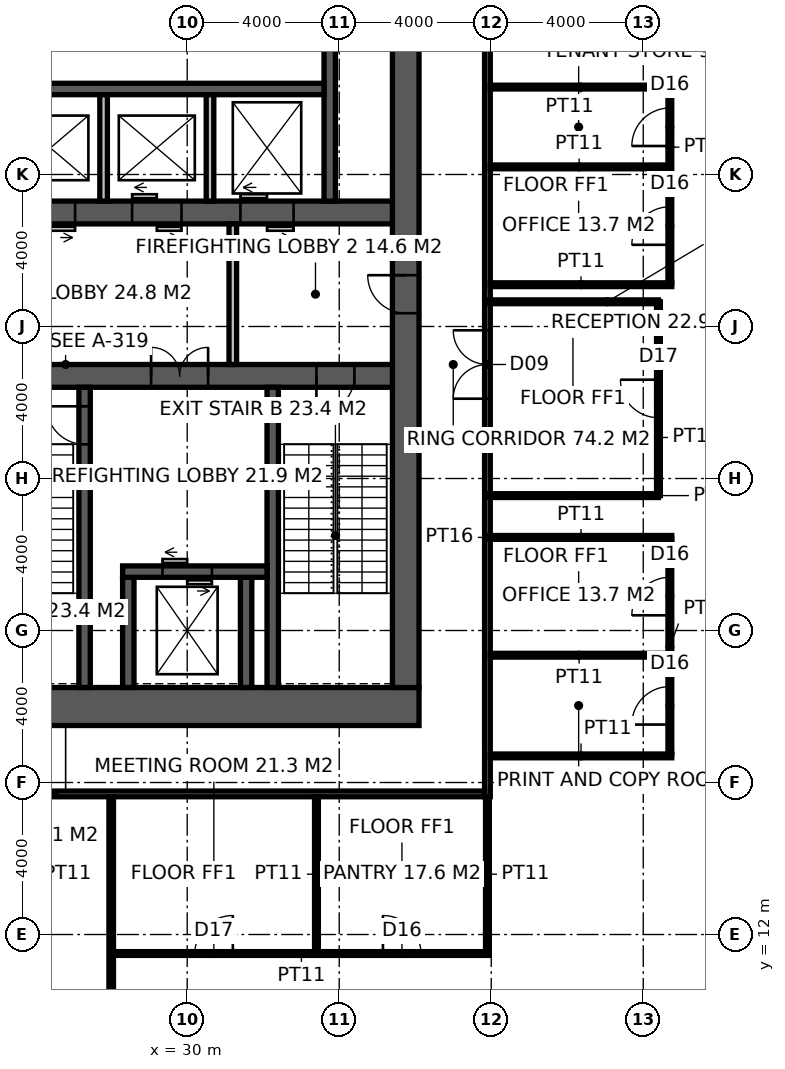
"""IFC4 building model, lengths in metres.
Left out: names, types, materials, properties, quantities, classifications, styles, units other than length and angle.
Written with IfcOpenShell. Run it as: python <this file> out.ifc"""

import sys

from ifc_helpers import new_model, si_unit, direction, frame, frame_2d, origin, place, context, subcontext, project, spatial, rectangle, extrude, element, fill, save


model = new_model("IFC4")
c1 = context("Model", 3, precision=1e-05, world=origin(), true_north=direction((0.0, 1.0)))
c2 = subcontext(c1, "Body", "Model", "MODEL_VIEW")
j1 = project(units=[si_unit("LENGTHUNIT", "METRE"), si_unit("PLANEANGLEUNIT", "RADIAN")], contexts=[c1])
p1 = place(None, origin())
s1 = spatial("IfcSite", under=j1, at=p1, CompositionType="ELEMENT")
p2 = place(p1, origin())
s2 = spatial("IfcBuilding", under=s1, at=p2, CompositionType="ELEMENT")
p3 = place(p2, frame((0.0, 0.0, 76.4)))
s3 = spatial("IfcBuildingStorey", under=s2, at=p3, CompositionType="ELEMENT", Elevation=76.4)
p4 = place(p3, frame((18.5, 18.0, -0.15), z_axis=(0.0, 0.0, 1.0), x_axis=(1.0, 0.0, 0.0)))
e1 = element("IfcWall", 1, at=p4, inside=s3, PredefinedType="SHEAR", context=c2, shape_type="SweptSolid", body=[
    extrude(rectangle(XDim=17.6, YDim=1.0, at=frame_2d((8.8, 0.0))), origin(), (0.0, 0.0, 1.0), 5.0),
])
p5 = place(p4, frame((3.45, 0.0, 0.15)))
e2 = element("IfcOpeningElement", 2, at=p5, cuts=e1, PredefinedType="OPENING", context=c2, shape_type="SweptSolid", body=[
    extrude(rectangle(XDim=1.5, YDim=2.4, at=frame_2d((0.75, 1.2))), frame((0.0, 0.51, 0.0), z_axis=(0.0, -1.0, 0.0), x_axis=(1.0, 0.0, 0.0)), (0.0, 0.0, 1.0), 1.02),
])
p6 = place(p3, frame((35.75, 18.5, -0.15), z_axis=(0.0, 0.0, 1.0), x_axis=(0.0, 1.0, 0.0)))
e3 = element("IfcWall", 3, at=p6, inside=s3, PredefinedType="SHEAR", context=c2, shape_type="SweptSolid", body=[
    extrude(rectangle(XDim=17.0, YDim=0.7, at=frame_2d((8.5, 0.0))), origin(), (0.0, 0.0, 1.0), 5.0),
])
p7 = place(p6, frame((9.85, 0.0, 0.15)))
e4 = element("IfcOpeningElement", 4, at=p7, cuts=e3, PredefinedType="OPENING", context=c2, shape_type="SweptSolid", body=[
    extrude(rectangle(XDim=1.0, YDim=2.2, at=frame_2d((0.5, 1.1))), frame((0.0, 0.36, 0.0), z_axis=(0.0, -1.0, 0.0), x_axis=(1.0, 0.0, 0.0)), (0.0, 0.0, 1.0), 0.72),
])
p8 = place(p3, frame((24.15, 26.7, -0.15), z_axis=(0.0, 0.0, 1.0), x_axis=(1.0, 0.0, 0.0)))
e5 = element("IfcWall", 5, at=p8, inside=s3, PredefinedType="SHEAR", context=c2, shape_type="SweptSolid", body=[
    extrude(rectangle(XDim=11.25, YDim=0.6, at=frame_2d((5.625, 0.0))), origin(), (0.0, 0.0, 1.0), 5.0),
])
p9 = place(p8, frame((9.25, 0.0, 0.15)))
e6 = element("IfcOpeningElement", 6, at=p9, cuts=e5, PredefinedType="OPENING", context=c2, shape_type="SweptSolid", body=[
    extrude(rectangle(XDim=1.0, YDim=2.2, at=frame_2d((0.5, 1.1))), frame((0.0, 0.31, 0.0), z_axis=(0.0, -1.0, 0.0), x_axis=(1.0, 0.0, 0.0)), (0.0, 0.0, 1.0), 0.62),
])
p10 = place(p8, frame((4.9, 0.0, 0.15)))
e7 = element("IfcOpeningElement", 7, at=p10, cuts=e5, PredefinedType="OPENING", context=c2, shape_type="SweptSolid", body=[
    extrude(rectangle(XDim=1.5, YDim=2.4, at=frame_2d((0.75, 1.2))), frame((0.0, 0.31, 0.0), z_axis=(0.0, -1.0, 0.0), x_axis=(1.0, 0.0, 0.0)), (0.0, 0.0, 1.0), 0.62),
])
p11 = place(p3, frame((27.3, 18.5, -0.15), z_axis=(0.0, 0.0, 1.0), x_axis=(0.0, 1.0, 0.0)))
e8 = element("IfcWall", 8, at=p11, inside=s3, PredefinedType="SHEAR", context=c2, shape_type="SweptSolid", body=[
    extrude(rectangle(XDim=7.9, YDim=0.3, at=frame_2d((3.95, 0.0))), origin(), (0.0, 0.0, 1.0), 5.0),
])
p12 = place(p11, frame((6.4, 0.0, 0.15)))
e9 = element("IfcOpeningElement", 9, at=p12, cuts=e8, PredefinedType="OPENING", context=c2, shape_type="SweptSolid", body=[
    extrude(rectangle(XDim=1.0, YDim=2.2, at=frame_2d((0.5, 1.1))), frame((0.0, 0.16, 0.0), z_axis=(0.0, -1.0, 0.0), x_axis=(1.0, 0.0, 0.0)), (0.0, 0.0, 1.0), 0.32),
])
p13 = place(p3, frame((32.25, 18.5, -0.15), z_axis=(0.0, 0.0, 1.0), x_axis=(0.0, 1.0, 0.0)))
e10 = element("IfcWall", 10, at=p13, inside=s3, PredefinedType="SHEAR", context=c2, shape_type="SweptSolid", body=[
    extrude(rectangle(XDim=7.9, YDim=0.3, at=frame_2d((3.95, 0.0))), origin(), (0.0, 0.0, 1.0), 5.0),
])
for number, where, z_axis, x_axis in (
    (11, (28.45, 18.5, -0.15), (0.0, 0.0, 1.0), (0.0, 1.0, 0.0)),
    (12, (31.55, 18.5, -0.15), (0.0, 0.0, 1.0), (0.0, 1.0, 0.0)),
):
    element("IfcWall", number, at=place(p3, frame(where, z_axis=z_axis, x_axis=x_axis)), inside=s3, PredefinedType="SHEAR", context=c2, shape_type="SweptSolid", body=[
        extrude(rectangle(XDim=2.9, YDim=0.3, at=frame_2d((1.45, 0.0))), origin(), (0.0, 0.0, 1.0), 5.0),
    ])
p14 = place(p3, frame((28.3, 21.55, -0.15), z_axis=(0.0, 0.0, 1.0), x_axis=(1.0, 0.0, 0.0)))
e13 = element("IfcWall", 13, at=p14, inside=s3, PredefinedType="SHEAR", context=c2, shape_type="SweptSolid", body=[
    extrude(rectangle(XDim=3.8, YDim=0.3, at=frame_2d((1.9, 0.0))), origin(), (0.0, 0.0, 1.0), 5.0),
])
p15 = place(p14, frame((1.05, 0.0, 0.15)))
e14 = element("IfcOpeningElement", 14, at=p15, cuts=e13, PredefinedType="OPENING", context=c2, shape_type="SweptSolid", body=[
    extrude(rectangle(XDim=1.3, YDim=2.4, at=frame_2d((0.65, 1.2))), frame((0.0, 0.16, 0.0), z_axis=(0.0, -1.0, 0.0), x_axis=(1.0, 0.0, 0.0)), (0.0, 0.0, 1.0), 0.32),
])
p16 = place(p3, frame((24.15, 31.0, -0.15), z_axis=(0.0, 0.0, 1.0), x_axis=(1.0, 0.0, 0.0)))
e15 = element("IfcWall", 15, at=p16, inside=s3, PredefinedType="SHEAR", context=c2, shape_type="SweptSolid", body=[
    extrude(rectangle(XDim=11.25, YDim=0.6, at=frame_2d((5.625, 0.0))), origin(), (0.0, 0.0, 1.0), 5.0),
])
p17 = place(p16, frame((1.6, 0.0, 0.15)))
e16 = element("IfcOpeningElement", 16, at=p17, cuts=e15, PredefinedType="OPENING", context=c2, shape_type="SweptSolid", body=[
    extrude(rectangle(XDim=1.3, YDim=2.4, at=frame_2d((0.65, 1.2))), frame((0.0, 0.31, 0.0), z_axis=(0.0, -1.0, 0.0), x_axis=(1.0, 0.0, 0.0)), (0.0, 0.0, 1.0), 0.62),
])
p18 = place(p16, frame((4.4, 0.0, 0.15)))
e17 = element("IfcOpeningElement", 17, at=p18, cuts=e15, PredefinedType="OPENING", context=c2, shape_type="SweptSolid", body=[
    extrude(rectangle(XDim=1.3, YDim=2.4, at=frame_2d((0.65, 1.2))), frame((0.0, 0.31, 0.0), z_axis=(0.0, -1.0, 0.0), x_axis=(1.0, 0.0, 0.0)), (0.0, 0.0, 1.0), 0.62),
])
p19 = place(p16, frame((7.25, 0.0, 0.15)))
e18 = element("IfcOpeningElement", 18, at=p19, cuts=e15, PredefinedType="OPENING", context=c2, shape_type="SweptSolid", body=[
    extrude(rectangle(XDim=1.4, YDim=2.4, at=frame_2d((0.7, 1.2))), frame((0.0, 0.31, 0.0), z_axis=(0.0, -1.0, 0.0), x_axis=(1.0, 0.0, 0.0)), (0.0, 0.0, 1.0), 0.62),
])
p20 = place(p3, frame((33.75, 31.3, -0.15), z_axis=(0.0, 0.0, 1.0), x_axis=(0.0, 1.0, 0.0)))
e19 = element("IfcWall", 19, at=p20, inside=s3, PredefinedType="SHEAR", context=c2, shape_type="SweptSolid", body=[
    extrude(rectangle(XDim=4.2, YDim=0.3, at=frame_2d((2.1, 0.0))), origin(), (0.0, 0.0, 1.0), 5.0),
])
p21 = place(p3, frame((25.0, 34.25, -0.15), z_axis=(0.0, 0.0, 1.0), x_axis=(1.0, 0.0, 0.0)))
e20 = element("IfcWall", 20, at=p21, inside=s3, PredefinedType="SHEAR", context=c2, shape_type="SweptSolid", body=[
    extrude(rectangle(XDim=8.6, YDim=0.3, at=frame_2d((4.3, 0.0))), origin(), (0.0, 0.0, 1.0), 5.0),
])
for number, where, z_axis, x_axis in (
    (21, (27.8, 31.3, -0.15), (0.0, 0.0, 1.0), (0.0, 1.0, 0.0)),
    (22, (30.6, 31.3, -0.15), (0.0, 0.0, 1.0), (0.0, 1.0, 0.0)),
):
    element("IfcWall", number, at=place(p3, frame(where, z_axis=z_axis, x_axis=x_axis)), inside=s3, PredefinedType="SOLIDWALL", context=c2, shape_type="SweptSolid", body=[
        extrude(rectangle(XDim=2.8, YDim=0.2, at=frame_2d((1.4, 0.0))), origin(), (0.0, 0.0, 1.0), 5.0),
    ])
p22 = place(p3, frame((31.2, 27.0, 0.0), z_axis=(0.0, 0.0, 1.0), x_axis=(0.0, 1.0, 0.0)))
e23 = element("IfcWall", 23, at=p22, inside=s3, PredefinedType="SOLIDWALL", context=c2, shape_type="SweptSolid", body=[
    extrude(rectangle(XDim=3.7, YDim=0.2, at=frame_2d((1.85, 0.0))), origin(), (0.0, 0.0, 1.0), 4.85),
])
p23 = place(p3, frame((37.9, 15.625, 0.0), z_axis=(0.0, 0.0, 1.0), x_axis=(0.0, 1.0, 0.0)))
e24 = element("IfcWall", 24, at=p23, inside=s3, PredefinedType="PARTITIONING", context=c2, shape_type="SweptSolid", body=[
    extrude(rectangle(XDim=22.75, YDim=0.15, at=frame_2d((11.375, 0.0))), origin(), (0.0, 0.0, 1.0), 3.95),
])
p24 = place(p23, frame((10.475, 0.0, 0.0)))
e25 = element("IfcOpeningElement", 25, at=p24, cuts=e24, PredefinedType="OPENING", context=c2, shape_type="SweptSolid", body=[
    extrude(rectangle(XDim=1.8, YDim=2.4, at=frame_2d((0.9, 1.2))), frame((0.0, 0.085, 0.0), z_axis=(0.0, -1.0, 0.0), x_axis=(1.0, 0.0, 0.0)), (0.0, 0.0, 1.0), 0.17),
])
p25 = place(p3, frame((15.175, 15.7, 0.0), z_axis=(0.0, 0.0, 1.0), x_axis=(1.0, 0.0, 0.0)))
e26 = element("IfcWall", 26, at=p25, inside=s3, PredefinedType="PARTITIONING", context=c2, shape_type="SweptSolid", body=[
    extrude(rectangle(XDim=22.65, YDim=0.15, at=frame_2d((11.325, 0.0))), origin(), (0.0, 0.0, 1.0), 4.85),
])
p26 = place(p3, frame((28.0, 0.3, 0.0), z_axis=(0.0, 0.0, 1.0), x_axis=(0.0, 1.0, 0.0)))
e27 = element("IfcWall", 27, at=p26, inside=s3, PredefinedType="PARTITIONING", context=c2, shape_type="SweptSolid", body=[
    extrude(rectangle(XDim=15.325, YDim=0.12, at=frame_2d((7.663, 0.0))), origin(), (0.0, 0.0, 1.0), 4.85),
])
p27 = place(p3, frame((28.061, 11.5, 0.0), z_axis=(0.0, 0.0, 1.0), x_axis=(1.0, 0.0, 0.0)))
e28 = element("IfcWall", 28, at=p27, inside=s3, PredefinedType="PARTITIONING", context=c2, shape_type="SweptSolid", body=[
    extrude(rectangle(XDim=9.889, YDim=0.1, at=frame_2d((4.944, 0.0))), origin(), (0.0, 0.0, 1.0), 4.85),
])
p28 = place(p27, frame((2.14, 0.0, 0.0)))
e29 = element("IfcOpeningElement", 29, at=p28, cuts=e28, PredefinedType="OPENING", context=c2, shape_type="SweptSolid", body=[
    extrude(rectangle(XDim=1.0, YDim=2.2, at=frame_2d((0.5, 1.1))), frame((0.0, 0.06, 0.0), z_axis=(0.0, -1.0, 0.0), x_axis=(1.0, 0.0, 0.0)), (0.0, 0.0, 1.0), 0.12),
])
p29 = place(p27, frame((7.09, 0.0, 0.0)))
e30 = element("IfcOpeningElement", 30, at=p29, cuts=e28, PredefinedType="OPENING", context=c2, shape_type="SweptSolid", body=[
    extrude(rectangle(XDim=1.0, YDim=2.2, at=frame_2d((0.5, 1.1))), frame((0.0, 0.06, 0.0), z_axis=(0.0, -1.0, 0.0), x_axis=(1.0, 0.0, 0.0)), (0.0, 0.0, 1.0), 0.12),
])
p30 = place(p3, frame((37.975, 16.7, 0.0), z_axis=(0.0, 0.0, 1.0), x_axis=(1.0, 0.0, 0.0)))
e31 = element("IfcWall", 31, at=p30, inside=s3, PredefinedType="PARTITIONING", context=c2, shape_type="SweptSolid", body=[
    extrude(rectangle(XDim=4.775, YDim=0.1, at=frame_2d((2.387, 0.0))), origin(), (0.0, 0.0, 1.0), 4.85),
])
p31 = place(p3, frame((37.975, 19.35, 0.0), z_axis=(0.0, 0.0, 1.0), x_axis=(1.0, 0.0, 0.0)))
e32 = element("IfcWall", 32, at=p31, inside=s3, PredefinedType="PARTITIONING", context=c2, shape_type="SweptSolid", body=[
    extrude(rectangle(XDim=4.675, YDim=0.1, at=frame_2d((2.337, 0.0))), origin(), (0.0, 0.0, 1.0), 4.85),
])
for number, where, z_axis, x_axis in (
    (33, (37.975, 22.45, 0.0), (0.0, 0.0, 1.0), (1.0, 0.0, 0.0)),
    (34, (37.975, 29.1, 0.0), (0.0, 0.0, 1.0), (1.0, 0.0, 0.0)),
):
    element("IfcWall", number, at=place(p3, frame(where, z_axis=z_axis, x_axis=x_axis)), inside=s3, PredefinedType="PARTITIONING", context=c2, shape_type="SweptSolid", body=[
        extrude(rectangle(XDim=4.775, YDim=0.1, at=frame_2d((2.387, 0.0))), origin(), (0.0, 0.0, 1.0), 4.85),
    ])
p32 = place(p3, frame((37.975, 32.2, 0.0), z_axis=(0.0, 0.0, 1.0), x_axis=(1.0, 0.0, 0.0)))
e35 = element("IfcWall", 35, at=p32, inside=s3, PredefinedType="PARTITIONING", context=c2, shape_type="SweptSolid", body=[
    extrude(rectangle(XDim=4.675, YDim=0.1, at=frame_2d((2.337, 0.0))), origin(), (0.0, 0.0, 1.0), 3.95),
])
p33 = place(p3, frame((37.975, 34.3, 0.0), z_axis=(0.0, 0.0, 1.0), x_axis=(1.0, 0.0, 0.0)))
e36 = element("IfcWall", 36, at=p33, inside=s3, PredefinedType="PARTITIONING", context=c2, shape_type="SweptSolid", body=[
    extrude(rectangle(XDim=4.775, YDim=0.1, at=frame_2d((2.387, 0.0))), origin(), (0.0, 0.0, 1.0), 4.85),
])
p34 = place(p3, frame((33.401, 11.55, 0.0), z_axis=(0.0, 0.0, 1.0), x_axis=(0.0, 1.0, 0.0)))
e37 = element("IfcWall", 37, at=p34, inside=s3, PredefinedType="PARTITIONING", context=c2, shape_type="SweptSolid", body=[
    extrude(rectangle(XDim=4.075, YDim=0.1, at=frame_2d((2.038, 0.0))), origin(), (0.0, 0.0, 1.0), 4.85),
])
p35 = place(p3, frame((37.9, 11.55, 0.0), z_axis=(0.0, 0.0, 1.0), x_axis=(0.0, 1.0, 0.0)))
e38 = element("IfcWall", 38, at=p35, inside=s3, PredefinedType="PARTITIONING", context=c2, shape_type="SweptSolid", body=[
    extrude(rectangle(XDim=4.075, YDim=0.1, at=frame_2d((2.038, 0.0))), origin(), (0.0, 0.0, 1.0), 3.95),
])
p36 = place(p3, frame((42.7, 16.75, 0.0), z_axis=(0.0, 0.0, 1.0), x_axis=(0.0, 1.0, 0.0)))
e39 = element("IfcWall", 39, at=p36, inside=s3, PredefinedType="PARTITIONING", context=c2, shape_type="SweptSolid", body=[
    extrude(rectangle(XDim=5.65, YDim=0.1, at=frame_2d((2.825, 0.0))), origin(), (0.0, 0.0, 1.0), 4.85),
])
p37 = place(p36, frame((0.775, 0.0, 0.0)))
e40 = element("IfcOpeningElement", 40, at=p37, cuts=e39, PredefinedType="OPENING", context=c2, shape_type="SweptSolid", body=[
    extrude(rectangle(XDim=1.0, YDim=2.2, at=frame_2d((0.5, 1.1))), frame((0.0, 0.06, 0.0), z_axis=(0.0, -1.0, 0.0), x_axis=(1.0, 0.0, 0.0)), (0.0, 0.0, 1.0), 0.12),
])
p38 = place(p36, frame((3.65, 0.0, 0.0)))
e41 = element("IfcOpeningElement", 41, at=p38, cuts=e39, PredefinedType="OPENING", context=c2, shape_type="SweptSolid", body=[
    extrude(rectangle(XDim=1.0, YDim=2.2, at=frame_2d((0.5, 1.1))), frame((0.0, 0.06, 0.0), z_axis=(0.0, -1.0, 0.0), x_axis=(1.0, 0.0, 0.0)), (0.0, 0.0, 1.0), 0.12),
])
p39 = place(p3, frame((42.7, 29.15, 0.0), z_axis=(0.0, 0.0, 1.0), x_axis=(0.0, 1.0, 0.0)))
e42 = element("IfcWall", 42, at=p39, inside=s3, PredefinedType="PARTITIONING", context=c2, shape_type="SweptSolid", body=[
    extrude(rectangle(XDim=5.1, YDim=0.1, at=frame_2d((2.55, 0.0))), origin(), (0.0, 0.0, 1.0), 4.85),
])
p40 = place(p39, frame((1.0, 0.0, 0.0)))
e43 = element("IfcOpeningElement", 43, at=p40, cuts=e42, PredefinedType="OPENING", context=c2, shape_type="SweptSolid", body=[
    extrude(rectangle(XDim=1.0, YDim=2.2, at=frame_2d((0.5, 1.1))), frame((0.0, 0.06, 0.0), z_axis=(0.0, -1.0, 0.0), x_axis=(1.0, 0.0, 0.0)), (0.0, 0.0, 1.0), 0.12),
])
p41 = place(p39, frame((3.6, 0.0, 0.0)))
e44 = element("IfcOpeningElement", 44, at=p41, cuts=e42, PredefinedType="OPENING", context=c2, shape_type="SweptSolid", body=[
    extrude(rectangle(XDim=1.0, YDim=2.2, at=frame_2d((0.5, 1.1))), frame((0.0, 0.06, 0.0), z_axis=(0.0, -1.0, 0.0), x_axis=(1.0, 0.0, 0.0)), (0.0, 0.0, 1.0), 0.12),
])
p42 = place(p3, frame((37.9, 23.55, 0.0), z_axis=(0.0, 0.0, 1.0), x_axis=(1.0, 0.0, 0.0)))
e45 = element("IfcWall", 45, at=p42, inside=s3, PredefinedType="PARTITIONING", context=c2, shape_type="SweptSolid", body=[
    extrude(rectangle(XDim=4.5, YDim=0.1, at=frame_2d((2.25, 0.0))), origin(), (0.0, 0.0, 1.0), 3.95),
])
p43 = place(p3, frame((42.4, 23.55, 0.0), z_axis=(0.0, 0.0, 1.0), x_axis=(0.0, 1.0, 0.0)))
e46 = element("IfcWall", 46, at=p43, inside=s3, PredefinedType="PARTITIONING", context=c2, shape_type="SweptSolid", body=[
    extrude(rectangle(XDim=5.1, YDim=0.1, at=frame_2d((2.55, 0.0))), origin(), (0.0, 0.0, 1.0), 4.85),
])
p44 = place(p43, frame((2.05, 0.0, 0.0)))
e47 = element("IfcOpeningElement", 47, at=p44, cuts=e46, PredefinedType="OPENING", context=c2, shape_type="SweptSolid", body=[
    extrude(rectangle(XDim=1.0, YDim=2.2, at=frame_2d((0.5, 1.1))), frame((0.0, 0.06, 0.0), z_axis=(0.0, -1.0, 0.0), x_axis=(1.0, 0.0, 0.0)), (0.0, 0.0, 1.0), 0.12),
])
p45 = place(p3, frame((42.4, 28.65, 0.0), z_axis=(0.0, 0.0, 1.0), x_axis=(-1.0, 0.0, 0.0)))
e48 = element("IfcWall", 48, at=p45, inside=s3, PredefinedType="PARTITIONING", context=c2, shape_type="SweptSolid", body=[
    extrude(rectangle(XDim=4.5, YDim=0.1, at=frame_2d((2.25, 0.0))), origin(), (0.0, 0.0, 1.0), 4.85),
])
p46 = place(p12, origin())
e49 = element("IfcDoor", 49, at=p46, inside=s3, OperationType="SINGLE_SWING_RIGHT", PredefinedType="DOOR", context=c2, shape_type="SweptSolid", body=[
    extrude(rectangle(XDim=1.0, YDim=2.2, at=frame_2d((0.5, 1.1))), frame((0.0, 0.025, 0.0), z_axis=(0.0, -1.0, 0.0), x_axis=(1.0, 0.0, 0.0)), (0.0, 0.0, 1.0), 0.05),
])
fill(e9, e49)
p47 = place(p9, frame((1.0, 0.0, 0.0), z_axis=(0.0, 0.0, 1.0), x_axis=(-1.0, 0.0, 0.0)))
e50 = element("IfcDoor", 50, at=p47, inside=s3, OperationType="SINGLE_SWING_RIGHT", PredefinedType="DOOR", context=c2, shape_type="SweptSolid", body=[
    extrude(rectangle(XDim=1.0, YDim=2.2, at=frame_2d((0.5, 1.1))), frame((0.0, 0.025, 0.0), z_axis=(0.0, -1.0, 0.0), x_axis=(1.0, 0.0, 0.0)), (0.0, 0.0, 1.0), 0.05),
])
fill(e6, e50)
p48 = place(p7, origin())
e51 = element("IfcDoor", 51, at=p48, inside=s3, OperationType="SINGLE_SWING_RIGHT", PredefinedType="DOOR", context=c2, shape_type="SweptSolid", body=[
    extrude(rectangle(XDim=1.0, YDim=2.2, at=frame_2d((0.5, 1.1))), frame((0.0, 0.025, 0.0), z_axis=(0.0, -1.0, 0.0), x_axis=(1.0, 0.0, 0.0)), (0.0, 0.0, 1.0), 0.05),
])
fill(e4, e51)
p49 = place(p10, origin())
e52 = element("IfcDoor", 52, at=p49, inside=s3, OperationType="DOUBLE_DOOR_DOUBLE_SWING", PredefinedType="DOOR", context=c2, shape_type="SweptSolid", body=[
    extrude(rectangle(XDim=1.5, YDim=2.4, at=frame_2d((0.75, 1.2))), frame((0.0, 0.025, 0.0), z_axis=(0.0, -1.0, 0.0), x_axis=(1.0, 0.0, 0.0)), (0.0, 0.0, 1.0), 0.05),
])
fill(e7, e52)
p50 = place(p24, origin())
e53 = element("IfcDoor", 53, at=p50, inside=s3, OperationType="DOUBLE_DOOR_DOUBLE_SWING", PredefinedType="DOOR", context=c2, shape_type="SweptSolid", body=[
    extrude(rectangle(XDim=1.8, YDim=2.4, at=frame_2d((0.9, 1.2))), frame((0.0, 0.025, 0.0), z_axis=(0.0, -1.0, 0.0), x_axis=(1.0, 0.0, 0.0)), (0.0, 0.0, 1.0), 0.05),
])
fill(e25, e53)
p51 = place(p28, origin())
e54 = element("IfcDoor", 54, at=p51, inside=s3, OperationType="SINGLE_SWING_RIGHT", PredefinedType="DOOR", context=c2, shape_type="SweptSolid", body=[
    extrude(rectangle(XDim=1.0, YDim=2.2, at=frame_2d((0.5, 1.1))), frame((0.0, 0.025, 0.0), z_axis=(0.0, -1.0, 0.0), x_axis=(1.0, 0.0, 0.0)), (0.0, 0.0, 1.0), 0.05),
])
fill(e29, e54)
p52 = place(p29, origin())
e55 = element("IfcDoor", 55, at=p52, inside=s3, OperationType="SINGLE_SWING_LEFT", PredefinedType="DOOR", context=c2, shape_type="SweptSolid", body=[
    extrude(rectangle(XDim=1.0, YDim=2.2, at=frame_2d((0.5, 1.1))), frame((0.0, 0.025, 0.0), z_axis=(0.0, -1.0, 0.0), x_axis=(1.0, 0.0, 0.0)), (0.0, 0.0, 1.0), 0.05),
])
fill(e30, e55)
p53 = place(p37, origin())
e56 = element("IfcDoor", 56, at=p53, inside=s3, OperationType="SINGLE_SWING_LEFT", PredefinedType="DOOR", context=c2, shape_type="SweptSolid", body=[
    extrude(rectangle(XDim=1.0, YDim=2.2, at=frame_2d((0.5, 1.1))), frame((0.0, 0.025, 0.0), z_axis=(0.0, -1.0, 0.0), x_axis=(1.0, 0.0, 0.0)), (0.0, 0.0, 1.0), 0.05),
])
fill(e40, e56)
p54 = place(p38, origin())
e57 = element("IfcDoor", 57, at=p54, inside=s3, OperationType="SINGLE_SWING_LEFT", PredefinedType="DOOR", context=c2, shape_type="SweptSolid", body=[
    extrude(rectangle(XDim=1.0, YDim=2.2, at=frame_2d((0.5, 1.1))), frame((0.0, 0.025, 0.0), z_axis=(0.0, -1.0, 0.0), x_axis=(1.0, 0.0, 0.0)), (0.0, 0.0, 1.0), 0.05),
])
fill(e41, e57)
p55 = place(p40, origin())
e58 = element("IfcDoor", 58, at=p55, inside=s3, OperationType="SINGLE_SWING_LEFT", PredefinedType="DOOR", context=c2, shape_type="SweptSolid", body=[
    extrude(rectangle(XDim=1.0, YDim=2.2, at=frame_2d((0.5, 1.1))), frame((0.0, 0.025, 0.0), z_axis=(0.0, -1.0, 0.0), x_axis=(1.0, 0.0, 0.0)), (0.0, 0.0, 1.0), 0.05),
])
fill(e43, e58)
p56 = place(p41, origin())
e59 = element("IfcDoor", 59, at=p56, inside=s3, OperationType="SINGLE_SWING_LEFT", PredefinedType="DOOR", context=c2, shape_type="SweptSolid", body=[
    extrude(rectangle(XDim=1.0, YDim=2.2, at=frame_2d((0.5, 1.1))), frame((0.0, 0.025, 0.0), z_axis=(0.0, -1.0, 0.0), x_axis=(1.0, 0.0, 0.0)), (0.0, 0.0, 1.0), 0.05),
])
fill(e44, e59)
p57 = place(p44, origin())
e60 = element("IfcDoor", 60, at=p57, inside=s3, OperationType="SINGLE_SWING_RIGHT", PredefinedType="DOOR", context=c2, shape_type="SweptSolid", body=[
    extrude(rectangle(XDim=1.0, YDim=2.2, at=frame_2d((0.5, 1.1))), frame((0.0, 0.025, 0.0), z_axis=(0.0, -1.0, 0.0), x_axis=(1.0, 0.0, 0.0)), (0.0, 0.0, 1.0), 0.05),
])
fill(e47, e60)
p58 = place(p15, origin())
e61 = element("IfcDoor", 61, at=p58, inside=s3, OperationType="DOUBLE_DOOR_SLIDING", PredefinedType="DOOR", context=c2, shape_type="SweptSolid", body=[
    extrude(rectangle(XDim=1.3, YDim=2.4, at=frame_2d((0.65, 1.2))), frame((0.0, 0.025, 0.0), z_axis=(0.0, -1.0, 0.0), x_axis=(1.0, 0.0, 0.0)), (0.0, 0.0, 1.0), 0.05),
])
fill(e14, e61)
p59 = place(p17, origin())
e62 = element("IfcDoor", 62, at=p59, inside=s3, OperationType="DOUBLE_DOOR_SLIDING", PredefinedType="DOOR", context=c2, shape_type="SweptSolid", body=[
    extrude(rectangle(XDim=1.3, YDim=2.4, at=frame_2d((0.65, 1.2))), frame((0.0, 0.025, 0.0), z_axis=(0.0, -1.0, 0.0), x_axis=(1.0, 0.0, 0.0)), (0.0, 0.0, 1.0), 0.05),
])
fill(e16, e62)
p60 = place(p18, origin())
e63 = element("IfcDoor", 63, at=p60, inside=s3, OperationType="DOUBLE_DOOR_SLIDING", PredefinedType="DOOR", context=c2, shape_type="SweptSolid", body=[
    extrude(rectangle(XDim=1.3, YDim=2.4, at=frame_2d((0.65, 1.2))), frame((0.0, 0.025, 0.0), z_axis=(0.0, -1.0, 0.0), x_axis=(1.0, 0.0, 0.0)), (0.0, 0.0, 1.0), 0.05),
])
fill(e17, e63)
p61 = place(p19, origin())
e64 = element("IfcDoor", 64, at=p61, inside=s3, OperationType="DOUBLE_DOOR_SLIDING", PredefinedType="DOOR", context=c2, shape_type="SweptSolid", body=[
    extrude(rectangle(XDim=1.4, YDim=2.4, at=frame_2d((0.7, 1.2))), frame((0.0, 0.025, 0.0), z_axis=(0.0, -1.0, 0.0), x_axis=(1.0, 0.0, 0.0)), (0.0, 0.0, 1.0), 0.05),
])
fill(e18, e64)
save(model, sys.argv[1])
